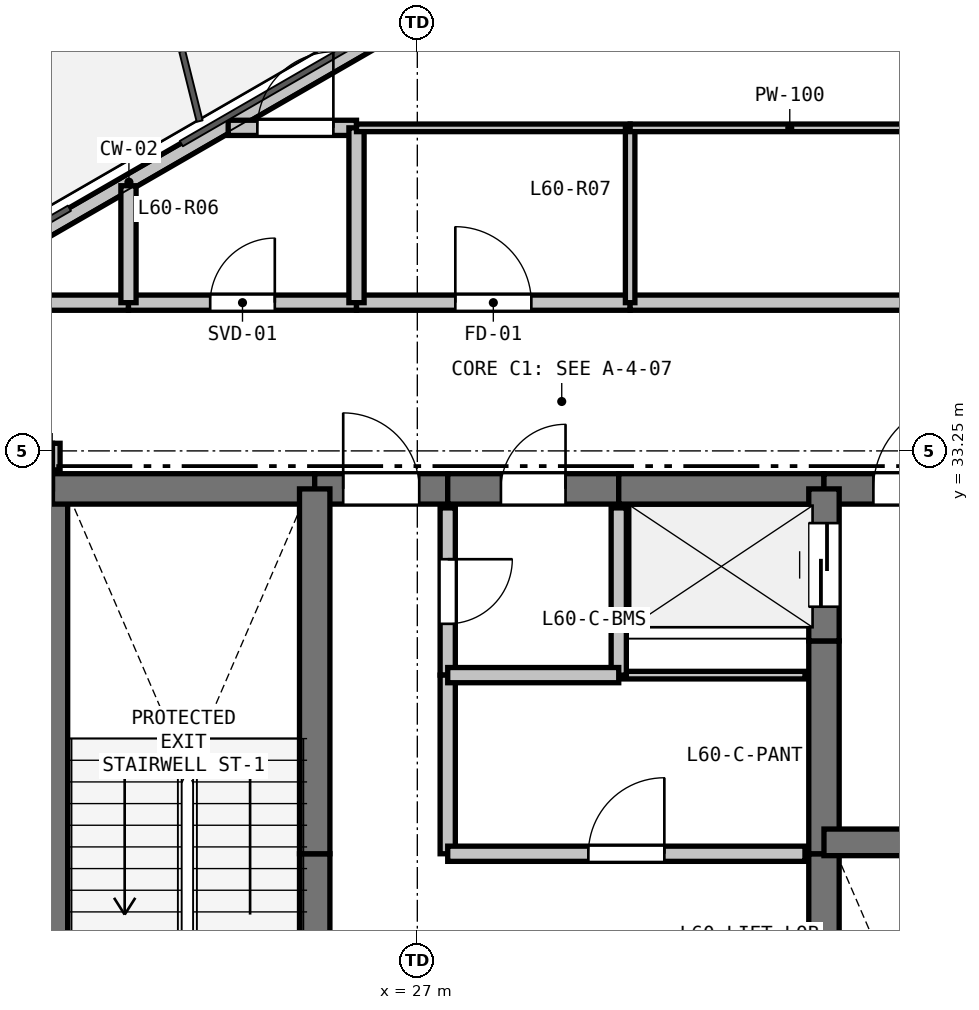
"""IFC4 building model, lengths in metres.
Left out: names, types, materials, properties, quantities, classifications, styles, units other than length and angle.
Written with IfcOpenShell. Run it as: python <this file> out.ifc"""

import sys

from ifc_helpers import new_model, si_unit, direction, frame, frame_2d, origin, place, context, subcontext, project, spatial, rectangle, extrude, element, fill, save


model = new_model("IFC4")
c1 = context("Model", 3, precision=1e-05, world=origin(), true_north=direction((0.0, 1.0)))
c2 = subcontext(c1, "Body", "Model", "MODEL_VIEW")
j1 = project(units=[si_unit("LENGTHUNIT", "METRE"), si_unit("PLANEANGLEUNIT", "RADIAN")], contexts=[c1])
p1 = place(None, origin())
s1 = spatial("IfcSite", under=j1, at=p1, CompositionType="ELEMENT")
p2 = place(p1, origin())
s2 = spatial("IfcBuilding", under=s1, at=p2, CompositionType="ELEMENT")
p3 = place(p2, frame((0.0, 0.0, 215.1)))
s3 = spatial("IfcBuildingStorey", under=s2, at=p3, CompositionType="ELEMENT", Elevation=215.1)
p4 = place(p3, frame((19.309, 34.536, 0.0), z_axis=(0.0, 0.0, 1.0), x_axis=(0.866020680503, 0.500008180874, 0.0)))
e1 = element("IfcWall", 1, at=p4, inside=s3, PredefinedType="PARAPET", context=c2, shape_type="SweptSolid", body=[
    extrude(rectangle(XDim=8.999, YDim=0.2, at=frame_2d((4.5, 0.0))), origin(), (0.0, 0.0, 1.0), 0.2),
])
p5 = place(p3, frame((22.2, 25.4, 0.0), z_axis=(0.0, 0.0, 1.0), x_axis=(0.0, 1.0, 0.0)))
e2 = element("IfcWall", 2, at=p5, inside=s3, PredefinedType="SHEAR", context=c2, shape_type="SweptSolid", body=[
    extrude(rectangle(XDim=7.35, YDim=0.4, at=frame_2d((3.675, 0.0))), origin(), (0.0, 0.0, 1.0), 3.02),
])
p6 = place(p3, frame((22.2, 32.75, 0.0), z_axis=(0.0, 0.0, 1.0), x_axis=(1.0, 0.0, 0.0)))
e3 = element("IfcWall", 3, at=p6, inside=s3, PredefinedType="SHEAR", context=c2, shape_type="SweptSolid", body=[
    extrude(rectangle(XDim=3.45, YDim=0.4, at=frame_2d((1.725, 0.0))), origin(), (0.0, 0.0, 1.0), 3.02),
])
p7 = place(p3, frame((25.65, 32.75, 0.0), z_axis=(0.0, 0.0, 1.0), x_axis=(1.0, 0.0, 0.0)))
e4 = element("IfcWall", 4, at=p7, inside=s3, PredefinedType="SHEAR", context=c2, shape_type="SweptSolid", body=[
    extrude(rectangle(XDim=1.75, YDim=0.4, at=frame_2d((0.875, 0.0))), origin(), (0.0, 0.0, 1.0), 3.02),
])
p8 = place(p7, frame((0.375, 0.0, 0.0)))
e5 = element("IfcOpeningElement", 5, at=p8, cuts=e4, PredefinedType="OPENING", context=c2, shape_type="SweptSolid", body=[
    extrude(rectangle(XDim=1.0, YDim=2.15, at=frame_2d((0.5, 1.075))), frame((0.0, 0.21, 0.0), z_axis=(0.0, -1.0, 0.0), x_axis=(1.0, 0.0, 0.0)), (0.0, 0.0, 1.0), 0.42),
])
p9 = place(p3, frame((27.4, 32.75, 0.0), z_axis=(0.0, 0.0, 1.0), x_axis=(1.0, 0.0, 0.0)))
e6 = element("IfcWall", 6, at=p9, inside=s3, PredefinedType="SHEAR", context=c2, shape_type="SweptSolid", body=[
    extrude(rectangle(XDim=2.25, YDim=0.4, at=frame_2d((1.125, 0.0))), origin(), (0.0, 0.0, 1.0), 3.02),
])
p10 = place(p9, frame((0.7, 0.0, 0.0)))
e7 = element("IfcOpeningElement", 7, at=p10, cuts=e6, PredefinedType="OPENING", context=c2, shape_type="SweptSolid", body=[
    extrude(rectangle(XDim=0.85, YDim=2.1, at=frame_2d((0.425, 1.05))), frame((0.0, 0.21, 0.0), z_axis=(0.0, -1.0, 0.0), x_axis=(1.0, 0.0, 0.0)), (0.0, 0.0, 1.0), 0.42),
])
p11 = place(p3, frame((29.65, 32.75, 0.0), z_axis=(0.0, 0.0, 1.0), x_axis=(1.0, 0.0, 0.0)))
e8 = element("IfcWall", 8, at=p11, inside=s3, PredefinedType="SHEAR", context=c2, shape_type="SweptSolid", body=[
    extrude(rectangle(XDim=2.7, YDim=0.4, at=frame_2d((1.35, 0.0))), origin(), (0.0, 0.0, 1.0), 3.02),
])
p12 = place(p3, frame((32.35, 32.75, 0.0), z_axis=(0.0, 0.0, 1.0), x_axis=(1.0, 0.0, 0.0)))
e9 = element("IfcWall", 9, at=p12, inside=s3, PredefinedType="SHEAR", context=c2, shape_type="SweptSolid", body=[
    extrude(rectangle(XDim=3.45, YDim=0.4, at=frame_2d((1.725, 0.0))), origin(), (0.0, 0.0, 1.0), 3.02),
])
p13 = place(p12, frame((0.65, 0.0, 0.0)))
e10 = element("IfcOpeningElement", 10, at=p13, cuts=e9, PredefinedType="OPENING", context=c2, shape_type="SweptSolid", body=[
    extrude(rectangle(XDim=1.15, YDim=2.15, at=frame_2d((0.575, 1.075))), frame((0.0, 0.21, 0.0), z_axis=(0.0, -1.0, 0.0), x_axis=(1.0, 0.0, 0.0)), (0.0, 0.0, 1.0), 0.42),
])
p14 = place(p3, frame((25.65, 25.55, 0.0), z_axis=(0.0, 0.0, 1.0), x_axis=(0.0, 1.0, 0.0)))
e11 = element("IfcWall", 11, at=p14, inside=s3, PredefinedType="SHEAR", context=c2, shape_type="SweptSolid", body=[
    extrude(rectangle(XDim=2.4, YDim=0.4, at=frame_2d((1.2, 0.0))), origin(), (0.0, 0.0, 1.0), 3.02),
])
p15 = place(p3, frame((25.65, 27.95, 0.0), z_axis=(0.0, 0.0, 1.0), x_axis=(0.0, 1.0, 0.0)))
e12 = element("IfcWall", 12, at=p15, inside=s3, PredefinedType="SHEAR", context=c2, shape_type="SweptSolid", body=[
    extrude(rectangle(XDim=4.8, YDim=0.4, at=frame_2d((2.4, 0.0))), origin(), (0.0, 0.0, 1.0), 3.02),
])
p16 = place(p3, frame((32.35, 25.55, 0.0), z_axis=(0.0, 0.0, 1.0), x_axis=(0.0, 1.0, 0.0)))
e13 = element("IfcWall", 13, at=p16, inside=s3, PredefinedType="SHEAR", context=c2, shape_type="SweptSolid", body=[
    extrude(rectangle(XDim=2.4, YDim=0.4, at=frame_2d((1.2, 0.0))), origin(), (0.0, 0.0, 1.0), 3.02),
])
p17 = place(p3, frame((32.35, 27.95, 0.0), z_axis=(0.0, 0.0, 1.0), x_axis=(0.0, 1.0, 0.0)))
e14 = element("IfcWall", 14, at=p17, inside=s3, PredefinedType="SHEAR", context=c2, shape_type="SweptSolid", body=[
    extrude(rectangle(XDim=2.8, YDim=0.4, at=frame_2d((1.4, 0.0))), origin(), (0.0, 0.0, 1.0), 3.02),
])
p18 = place(p3, frame((32.35, 30.75, 0.0), z_axis=(0.0, 0.0, 1.0), x_axis=(0.0, 1.0, 0.0)))
e15 = element("IfcWall", 15, at=p18, inside=s3, PredefinedType="SHEAR", context=c2, shape_type="SweptSolid", body=[
    extrude(rectangle(XDim=2.0, YDim=0.4, at=frame_2d((1.0, 0.0))), origin(), (0.0, 0.0, 1.0), 3.02),
])
p19 = place(p18, frame((0.45, 0.0, 0.0)))
e16 = element("IfcOpeningElement", 16, at=p19, cuts=e15, PredefinedType="OPENING", context=c2, shape_type="SweptSolid", body=[
    extrude(rectangle(XDim=1.1, YDim=2.15, at=frame_2d((0.55, 1.075))), frame((0.0, 0.21, 0.0), z_axis=(0.0, -1.0, 0.0), x_axis=(1.0, 0.0, 0.0)), (0.0, 0.0, 1.0), 0.42),
])
p20 = place(p3, frame((32.35, 28.1, 0.0), z_axis=(0.0, 0.0, 1.0), x_axis=(1.0, 0.0, 0.0)))
e17 = element("IfcWall", 17, at=p20, inside=s3, PredefinedType="SHEAR", context=c2, shape_type="SweptSolid", body=[
    extrude(rectangle(XDim=3.45, YDim=0.35, at=frame_2d((1.725, 0.0))), origin(), (0.0, 0.0, 1.0), 3.02),
])
p21 = place(p20, frame((1.15, 0.0, 0.0)))
e18 = element("IfcOpeningElement", 18, at=p21, cuts=e17, PredefinedType="OPENING", context=c2, shape_type="SweptSolid", body=[
    extrude(rectangle(XDim=1.15, YDim=2.15, at=frame_2d((0.575, 1.075))), frame((0.0, 0.185, 0.0), z_axis=(0.0, -1.0, 0.0), x_axis=(1.0, 0.0, 0.0)), (0.0, 0.0, 1.0), 0.37),
])
p22 = place(p3, frame((32.1, 30.3, 0.0), z_axis=(0.0, 0.0, 1.0), x_axis=(-1.0, 0.0, 0.0)))
e19 = element("IfcWall", 19, at=p22, inside=s3, PredefinedType="PARTITIONING", context=c2, shape_type="SweptSolid", body=[
    extrude(rectangle(XDim=2.45, YDim=0.1, at=frame_2d((1.225, 0.0))), origin(), (0.0, 0.0, 1.0), 3.02),
])
p23 = place(p3, frame((29.65, 30.3, 0.0), z_axis=(0.0, 0.0, 1.0), x_axis=(0.0, 1.0, 0.0)))
e20 = element("IfcWall", 20, at=p23, inside=s3, PredefinedType="PARTITIONING", context=c2, shape_type="SweptSolid", body=[
    extrude(rectangle(XDim=2.2, YDim=0.2, at=frame_2d((1.1, 0.0))), origin(), (0.0, 0.0, 1.0), 3.02),
])
p24 = place(p3, frame((27.4, 32.5, 0.0), z_axis=(0.0, 0.0, 1.0), x_axis=(0.0, -1.0, 0.0)))
e21 = element("IfcWall", 21, at=p24, inside=s3, PredefinedType="PARTITIONING", context=c2, shape_type="SweptSolid", body=[
    extrude(rectangle(XDim=2.2, YDim=0.2, at=frame_2d((1.1, 0.0))), origin(), (0.0, 0.0, 1.0), 3.02),
])
p25 = place(p24, frame((0.675, 0.0, 0.0)))
e22 = element("IfcOpeningElement", 22, at=p25, cuts=e21, PredefinedType="OPENING", context=c2, shape_type="SweptSolid", body=[
    extrude(rectangle(XDim=0.85, YDim=2.1, at=frame_2d((0.425, 1.05))), frame((0.0, 0.11, 0.0), z_axis=(0.0, -1.0, 0.0), x_axis=(1.0, 0.0, 0.0)), (0.0, 0.0, 1.0), 0.22),
])
p26 = place(p3, frame((27.4, 30.3, 0.0), z_axis=(0.0, 0.0, 1.0), x_axis=(0.0, -1.0, 0.0)))
e23 = element("IfcWall", 23, at=p26, inside=s3, PredefinedType="PARTITIONING", context=c2, shape_type="SweptSolid", body=[
    extrude(rectangle(XDim=2.35, YDim=0.2, at=frame_2d((1.175, 0.0))), origin(), (0.0, 0.0, 1.0), 3.02),
])
p27 = place(p3, frame((27.4, 27.95, 0.0), z_axis=(0.0, 0.0, 1.0), x_axis=(1.0, 0.0, 0.0)))
e24 = element("IfcWall", 24, at=p27, inside=s3, PredefinedType="PARTITIONING", context=c2, shape_type="SweptSolid", body=[
    extrude(rectangle(XDim=4.7, YDim=0.2, at=frame_2d((2.35, 0.0))), origin(), (0.0, 0.0, 1.0), 3.02),
])
p28 = place(p27, frame((1.85, 0.0, 0.0)))
e25 = element("IfcOpeningElement", 25, at=p28, cuts=e24, PredefinedType="OPENING", context=c2, shape_type="SweptSolid", body=[
    extrude(rectangle(XDim=1.0, YDim=2.15, at=frame_2d((0.5, 1.075))), frame((0.0, 0.11, 0.0), z_axis=(0.0, -1.0, 0.0), x_axis=(1.0, 0.0, 0.0)), (0.0, 0.0, 1.0), 0.22),
])
p29 = place(p3, frame((22.2, 33.0, 0.0), z_axis=(0.0, 0.0, 1.0), x_axis=(0.0, 1.0, 0.0)))
e26 = element("IfcWall", 26, at=p29, inside=s3, PredefinedType="PARTITIONING", context=c2, shape_type="SweptSolid", body=[
    extrude(rectangle(XDim=0.35, YDim=0.2, at=frame_2d((0.175, 0.0))), origin(), (0.0, 0.0, 1.0), 2.545),
])
p30 = place(p3, frame((20.528, 35.2, 0.0), z_axis=(0.0, 0.0, 1.0), x_axis=(1.0, 0.0, 0.0)))
e27 = element("IfcWall", 27, at=p30, inside=s3, PredefinedType="PARTITIONING", context=c2, shape_type="SweptSolid", body=[
    extrude(rectangle(XDim=2.672, YDim=0.2, at=frame_2d((1.336, 0.0))), origin(), (0.0, 0.0, 1.0), 2.365),
])
p31 = place(p3, frame((23.2, 35.2, 0.0), z_axis=(0.0, 0.0, 1.0), x_axis=(1.0, 0.0, 0.0)))
e28 = element("IfcWall", 28, at=p31, inside=s3, PredefinedType="PARTITIONING", context=c2, shape_type="SweptSolid", body=[
    extrude(rectangle(XDim=3.0, YDim=0.2, at=frame_2d((1.5, 0.0))), origin(), (0.0, 0.0, 1.0), 3.02),
])
p32 = place(p31, frame((1.075, 0.0, 0.0)))
e29 = element("IfcOpeningElement", 29, at=p32, cuts=e28, PredefinedType="OPENING", context=c2, shape_type="SweptSolid", body=[
    extrude(rectangle(XDim=0.85, YDim=2.1, at=frame_2d((0.425, 1.05))), frame((0.0, 0.11, 0.0), z_axis=(0.0, -1.0, 0.0), x_axis=(1.0, 0.0, 0.0)), (0.0, 0.0, 1.0), 0.22),
])
p33 = place(p3, frame((26.2, 35.2, 0.0), z_axis=(0.0, 0.0, 1.0), x_axis=(1.0, 0.0, 0.0)))
e30 = element("IfcWall", 30, at=p33, inside=s3, PredefinedType="PARTITIONING", context=c2, shape_type="SweptSolid", body=[
    extrude(rectangle(XDim=3.6, YDim=0.2, at=frame_2d((1.8, 0.0))), origin(), (0.0, 0.0, 1.0), 3.02),
])
p34 = place(p33, frame((1.3, 0.0, 0.0)))
e31 = element("IfcOpeningElement", 31, at=p34, cuts=e30, PredefinedType="OPENING", context=c2, shape_type="SweptSolid", body=[
    extrude(rectangle(XDim=1.0, YDim=2.15, at=frame_2d((0.5, 1.075))), frame((0.0, 0.11, 0.0), z_axis=(0.0, -1.0, 0.0), x_axis=(1.0, 0.0, 0.0)), (0.0, 0.0, 1.0), 0.22),
])
p35 = place(p3, frame((29.8, 35.2, 0.0), z_axis=(0.0, 0.0, 1.0), x_axis=(1.0, 0.0, 0.0)))
e32 = element("IfcWall", 32, at=p35, inside=s3, PredefinedType="PARTITIONING", context=c2, shape_type="SweptSolid", body=[
    extrude(rectangle(XDim=4.2, YDim=0.2, at=frame_2d((2.1, 0.0))), origin(), (0.0, 0.0, 1.0), 3.02),
])
p36 = place(p3, frame((27.4, 30.3, 0.0), z_axis=(0.0, 0.0, 1.0), x_axis=(1.0, 0.0, 0.0)))
e33 = element("IfcWall", 33, at=p36, inside=s3, PredefinedType="PARTITIONING", context=c2, shape_type="SweptSolid", body=[
    extrude(rectangle(XDim=2.25, YDim=0.2, at=frame_2d((1.125, 0.0))), origin(), (0.0, 0.0, 1.0), 3.02),
])
p37 = place(p3, frame((24.512, 37.5, 0.0), z_axis=(0.0, 0.0, 1.0), x_axis=(1.0, 0.0, 0.0)))
e34 = element("IfcWall", 34, at=p37, inside=s3, PredefinedType="PARTITIONING", context=c2, shape_type="SweptSolid", body=[
    extrude(rectangle(XDim=1.688, YDim=0.2, at=frame_2d((0.844, 0.0))), origin(), (0.0, 0.0, 1.0), 2.365),
])
p38 = place(p37, frame((0.384, 0.0, 0.0)))
e35 = element("IfcOpeningElement", 35, at=p38, cuts=e34, PredefinedType="OPENING", context=c2, shape_type="SweptSolid", body=[
    extrude(rectangle(XDim=1.0, YDim=2.15, at=frame_2d((0.5, 1.075))), frame((0.0, 0.11, 0.0), z_axis=(0.0, -1.0, 0.0), x_axis=(1.0, 0.0, 0.0)), (0.0, 0.0, 1.0), 0.22),
])
p39 = place(p3, frame((26.2, 37.5, 0.0), z_axis=(0.0, 0.0, 1.0), x_axis=(0.0, -1.0, 0.0)))
e36 = element("IfcWall", 36, at=p39, inside=s3, PredefinedType="PARTITIONING", context=c2, shape_type="SweptSolid", body=[
    extrude(rectangle(XDim=2.3, YDim=0.2, at=frame_2d((1.15, 0.0))), origin(), (0.0, 0.0, 1.0), 3.02),
])
p40 = place(p3, frame((23.2, 35.2, 0.0), z_axis=(0.0, 0.0, 1.0), x_axis=(0.0, 1.0, 0.0)))
e37 = element("IfcWall", 37, at=p40, inside=s3, PredefinedType="PARTITIONING", context=c2, shape_type="SweptSolid", body=[
    extrude(rectangle(XDim=1.539, YDim=0.2, at=frame_2d((0.769, 0.0))), origin(), (0.0, 0.0, 1.0), 2.365),
])
p41 = place(p3, frame((26.2, 37.5, 0.0), z_axis=(0.0, 0.0, 1.0), x_axis=(1.0, 0.0, 0.0)))
e38 = element("IfcWall", 38, at=p41, inside=s3, PredefinedType="PARTITIONING", context=c2, shape_type="SweptSolid", body=[
    extrude(rectangle(XDim=3.6, YDim=0.1, at=frame_2d((1.8, 0.0))), origin(), (0.0, 0.0, 1.0), 3.02),
])
p42 = place(p3, frame((29.8, 37.5, 0.0), z_axis=(0.0, 0.0, 1.0), x_axis=(0.0, -1.0, 0.0)))
e39 = element("IfcWall", 39, at=p42, inside=s3, PredefinedType="PARTITIONING", context=c2, shape_type="SweptSolid", body=[
    extrude(rectangle(XDim=2.3, YDim=0.125, at=frame_2d((1.15, 0.0))), origin(), (0.0, 0.0, 1.0), 3.02),
])
p43 = place(p3, frame((34.0, 37.5, 0.0), z_axis=(0.0, 0.0, 1.0), x_axis=(-1.0, 0.0, 0.0)))
e40 = element("IfcWall", 40, at=p43, inside=s3, PredefinedType="PARTITIONING", context=c2, shape_type="SweptSolid", body=[
    extrude(rectangle(XDim=4.2, YDim=0.1, at=frame_2d((2.1, 0.0))), origin(), (0.0, 0.0, 1.0), 3.02),
])
p44 = place(p8, origin())
e41 = element("IfcDoor", 41, at=p44, inside=s3, OperationType="SINGLE_SWING_LEFT", PredefinedType="DOOR", context=c2, shape_type="SweptSolid", body=[
    extrude(rectangle(XDim=1.0, YDim=2.15, at=frame_2d((0.5, 1.075))), frame((0.0, 0.025, 0.0), z_axis=(0.0, -1.0, 0.0), x_axis=(1.0, 0.0, 0.0)), (0.0, 0.0, 1.0), 0.05),
])
fill(e5, e41)
p45 = place(p19, origin())
e42 = element("IfcDoor", 42, at=p45, inside=s3, OperationType="SLIDING_TO_LEFT", PredefinedType="DOOR", context=c2, shape_type="SweptSolid", body=[
    extrude(rectangle(XDim=1.1, YDim=2.15, at=frame_2d((0.55, 1.075))), frame((0.0, 0.025, 0.0), z_axis=(0.0, -1.0, 0.0), x_axis=(1.0, 0.0, 0.0)), (0.0, 0.0, 1.0), 0.05),
])
fill(e16, e42)
p46 = place(p13, origin())
e43 = element("IfcDoor", 43, at=p46, inside=s3, OperationType="SINGLE_SWING_RIGHT", PredefinedType="DOOR", context=c2, shape_type="SweptSolid", body=[
    extrude(rectangle(XDim=1.15, YDim=2.15, at=frame_2d((0.575, 1.075))), frame((0.0, 0.025, 0.0), z_axis=(0.0, -1.0, 0.0), x_axis=(1.0, 0.0, 0.0)), (0.0, 0.0, 1.0), 0.05),
])
fill(e10, e43)
p47 = place(p28, origin())
e44 = element("IfcDoor", 44, at=p47, inside=s3, OperationType="SINGLE_SWING_RIGHT", PredefinedType="DOOR", context=c2, shape_type="SweptSolid", body=[
    extrude(rectangle(XDim=1.0, YDim=2.15, at=frame_2d((0.5, 1.075))), frame((0.0, 0.025, 0.0), z_axis=(0.0, -1.0, 0.0), x_axis=(1.0, 0.0, 0.0)), (0.0, 0.0, 1.0), 0.05),
])
fill(e25, e44)
p48 = place(p25, origin())
e45 = element("IfcDoor", 45, at=p48, inside=s3, OperationType="SINGLE_SWING_LEFT", PredefinedType="DOOR", context=c2, shape_type="SweptSolid", body=[
    extrude(rectangle(XDim=0.85, YDim=2.1, at=frame_2d((0.425, 1.05))), frame((0.0, 0.025, 0.0), z_axis=(0.0, -1.0, 0.0), x_axis=(1.0, 0.0, 0.0)), (0.0, 0.0, 1.0), 0.05),
])
fill(e22, e45)
p49 = place(p10, origin())
e46 = element("IfcDoor", 46, at=p49, inside=s3, OperationType="SINGLE_SWING_RIGHT", PredefinedType="DOOR", context=c2, shape_type="SweptSolid", body=[
    extrude(rectangle(XDim=0.85, YDim=2.1, at=frame_2d((0.425, 1.05))), frame((0.0, 0.025, 0.0), z_axis=(0.0, -1.0, 0.0), x_axis=(1.0, 0.0, 0.0)), (0.0, 0.0, 1.0), 0.05),
])
fill(e7, e46)
p50 = place(p32, origin())
e47 = element("IfcDoor", 47, at=p50, inside=s3, OperationType="SINGLE_SWING_RIGHT", PredefinedType="DOOR", context=c2, shape_type="SweptSolid", body=[
    extrude(rectangle(XDim=0.85, YDim=2.1, at=frame_2d((0.425, 1.05))), frame((0.0, 0.025, 0.0), z_axis=(0.0, -1.0, 0.0), x_axis=(1.0, 0.0, 0.0)), (0.0, 0.0, 1.0), 0.05),
])
fill(e29, e47)
p51 = place(p34, origin())
e48 = element("IfcDoor", 48, at=p51, inside=s3, OperationType="SINGLE_SWING_LEFT", PredefinedType="DOOR", context=c2, shape_type="SweptSolid", body=[
    extrude(rectangle(XDim=1.0, YDim=2.15, at=frame_2d((0.5, 1.075))), frame((0.0, 0.025, 0.0), z_axis=(0.0, -1.0, 0.0), x_axis=(1.0, 0.0, 0.0)), (0.0, 0.0, 1.0), 0.05),
])
fill(e31, e48)
p52 = place(p38, origin())
e49 = element("IfcDoor", 49, at=p52, inside=s3, OperationType="SINGLE_SWING_RIGHT", PredefinedType="DOOR", context=c2, shape_type="SweptSolid", body=[
    extrude(rectangle(XDim=1.0, YDim=2.15, at=frame_2d((0.5, 1.075))), frame((0.0, 0.025, 0.0), z_axis=(0.0, -1.0, 0.0), x_axis=(1.0, 0.0, 0.0)), (0.0, 0.0, 1.0), 0.05),
])
fill(e35, e49)
save(model, sys.argv[1])
